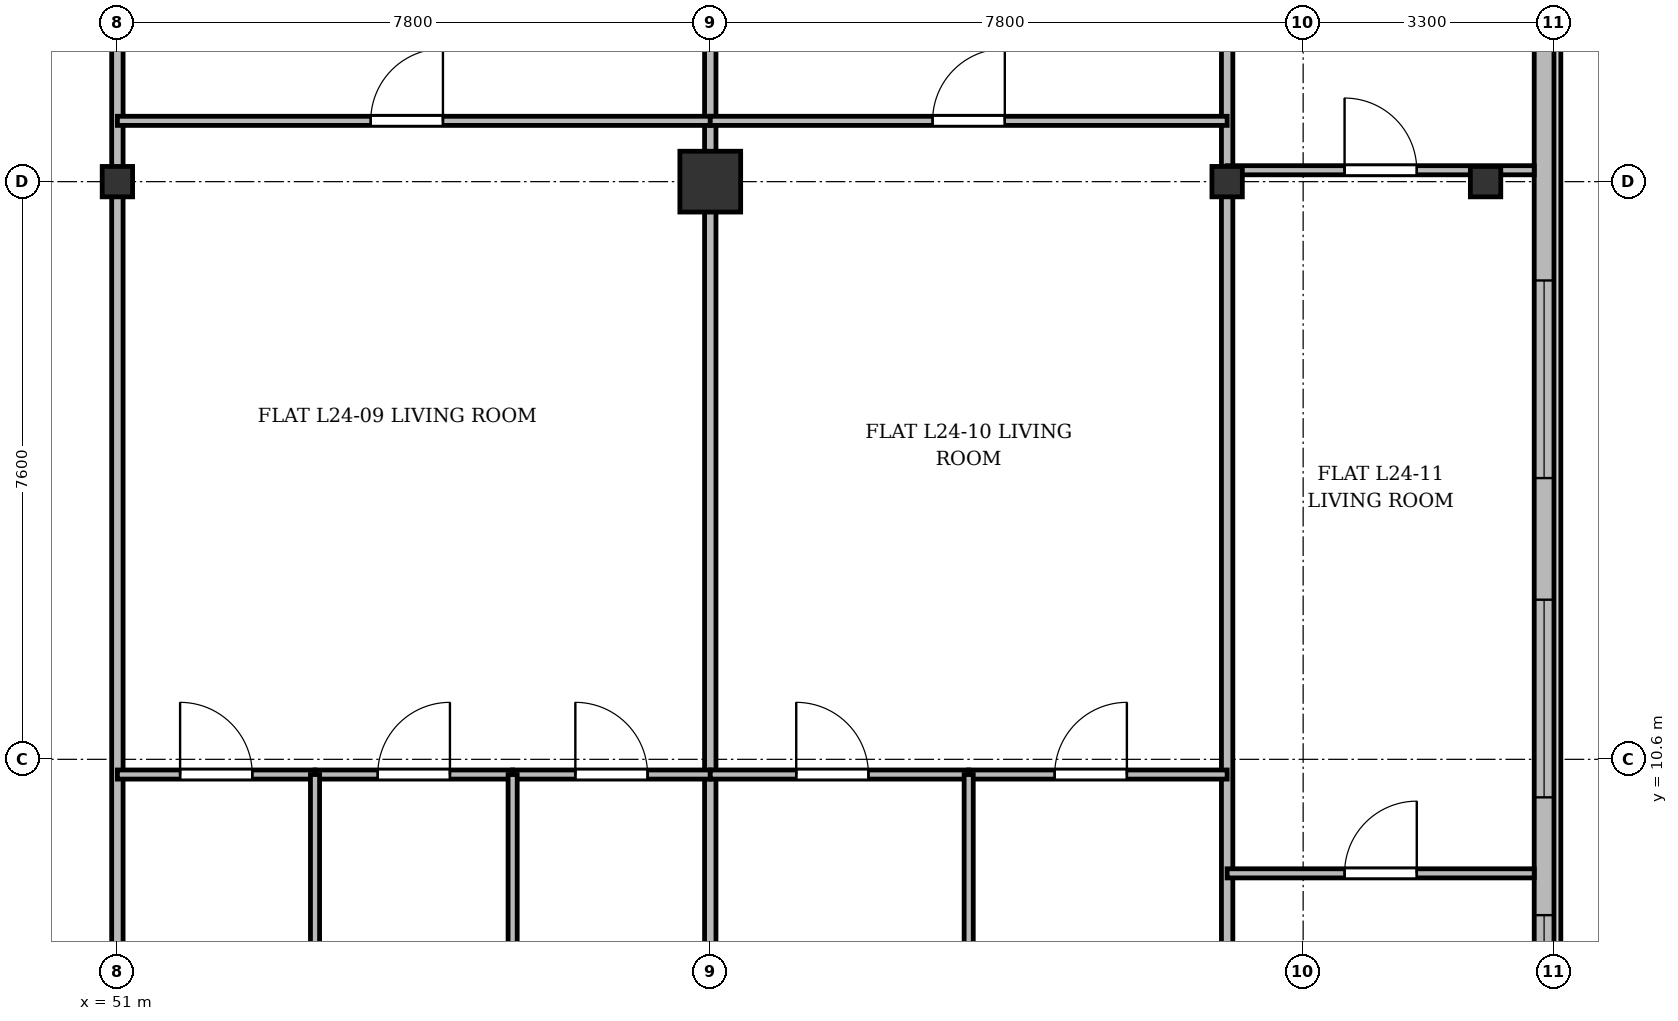
"""IFC4 building model, lengths in metres.
Left out: names, types, materials, properties, quantities, classifications, styles, units other than length and angle.
Written with IfcOpenShell. Run it as: python <this file> out.ifc"""

import sys

from ifc_helpers import new_model, si_unit, direction, frame, frame_2d, origin, origin_2d, place, context, subcontext, project, spatial, rectangle, i_section, extrude, source, transform, mapped, element, fill, save


model = new_model("IFC4")
c1 = context("Model", 3, precision=1e-05, world=origin(), true_north=direction((0.0, 1.0)))
c2 = subcontext(c1, "Body", "Model", "MODEL_VIEW")
j1 = project(units=[si_unit("LENGTHUNIT", "METRE"), si_unit("PLANEANGLEUNIT", "RADIAN")], contexts=[c1])
p1 = place(None, origin())
s1 = spatial("IfcSite", under=j1, at=p1, CompositionType="ELEMENT")
p2 = place(p1, origin())
s2 = spatial("IfcBuilding", under=s1, at=p2, CompositionType="ELEMENT")
p3 = place(p2, frame((0.0, 0.0, 96.1)))
s3 = spatial("IfcBuildingStorey", under=s2, at=p3, CompositionType="ELEMENT", Elevation=96.1)
m1 = source(origin(), c2, "Body", "SweptSolid", [
    extrude(i_section(OverallWidth=0.4, OverallDepth=0.4, WebThickness=0.022, FlangeThickness=0.035, at=origin_2d()), origin(), (0.0, 0.0, 1.0), 3.6),
])
p4 = place(p3, frame((51.0, 18.2, 0.0), z_axis=(0.0, 0.0, 1.0), x_axis=(1.0, 0.0, 0.0)))
e1 = element("IfcColumn", 1, at=p4, inside=s3, PredefinedType="COLUMN", context=c2, shape_type="MappedRepresentation", body=[
    mapped(m1, transform((0.0, 0.0, 0.0), x_axis=(1.0, 0.0, 0.0), y_axis=(0.0, 1.0, 0.0), z_axis=(0.0, 0.0, 1.0), scale=1.0)),
])
m2 = source(origin(), c2, "Body", "SweptSolid", [
    extrude(rectangle(XDim=0.8, YDim=0.8, at=origin_2d()), origin(), (0.0, 0.0, 1.0), 3.6),
])
p5 = place(p3, frame((58.8, 18.2, 0.0), z_axis=(0.0, 0.0, 1.0), x_axis=(1.0, 0.0, 0.0)))
e2 = element("IfcColumn", 2, at=p5, inside=s3, PredefinedType="COLUMN", context=c2, shape_type="MappedRepresentation", body=[
    mapped(m2, transform((0.0, 0.0, 0.0), x_axis=(1.0, 0.0, 0.0), y_axis=(0.0, 1.0, 0.0), z_axis=(0.0, 0.0, 1.0), scale=1.0)),
])
for number, where, z_axis, x_axis in (
    (3, (65.6, 18.2, 0.0), (0.0, 0.0, 1.0), (1.0, 0.0, 0.0)),
    (4, (69.0, 18.2, 0.0), (0.0, 0.0, 1.0), (1.0, 0.0, 0.0)),
):
    element("IfcColumn", number, at=place(p3, frame(where, z_axis=z_axis, x_axis=x_axis)), inside=s3, PredefinedType="COLUMN", context=c2, shape_type="MappedRepresentation", body=[
        mapped(m1, transform((0.0, 0.0, 0.0), x_axis=(1.0, 0.0, 0.0), y_axis=(0.0, 1.0, 0.0), z_axis=(0.0, 0.0, 1.0), scale=1.0)),
    ])
p6 = place(p3, frame((69.77, 45.5, 0.0), z_axis=(0.0, 0.0, 1.0), x_axis=(0.0, -1.0, 0.0)))
e5 = element("IfcWall", 5, at=p6, inside=s3, PredefinedType="SOLIDWALL", context=c2, shape_type="SweptSolid", body=[
    extrude(rectangle(XDim=39.6, YDim=0.26, at=frame_2d((19.8, 0.0))), origin(), (0.0, 0.0, 1.0), 3.34),
])
p7 = place(p6, frame((36.95, 0.0, 0.92)))
e6 = element("IfcOpeningElement", 6, at=p7, cuts=e5, PredefinedType="OPENING", context=c2, shape_type="SweptSolid", body=[
    extrude(rectangle(XDim=1.2, YDim=1.65, at=frame_2d((0.6, 0.825))), frame((0.0, 0.14, 0.0), z_axis=(0.0, -1.0, 0.0), x_axis=(1.0, 0.0, 0.0)), (0.0, 0.0, 1.0), 0.28),
])
p8 = place(p6, frame((32.8, 0.0, 0.92)))
e7 = element("IfcOpeningElement", 7, at=p8, cuts=e5, PredefinedType="OPENING", context=c2, shape_type="SweptSolid", body=[
    extrude(rectangle(XDim=2.6, YDim=1.9, at=frame_2d((1.3, 0.95))), frame((0.0, 0.14, 0.0), z_axis=(0.0, -1.0, 0.0), x_axis=(1.0, 0.0, 0.0)), (0.0, 0.0, 1.0), 0.28),
])
p9 = place(p6, frame((28.6, 0.0, 0.92)))
e8 = element("IfcOpeningElement", 8, at=p9, cuts=e5, PredefinedType="OPENING", context=c2, shape_type="SweptSolid", body=[
    extrude(rectangle(XDim=2.6, YDim=1.9, at=frame_2d((1.3, 0.95))), frame((0.0, 0.14, 0.0), z_axis=(0.0, -1.0, 0.0), x_axis=(1.0, 0.0, 0.0)), (0.0, 0.0, 1.0), 0.28),
])
p10 = place(p6, frame((21.4, 0.0, 0.92)))
e9 = element("IfcOpeningElement", 9, at=p10, cuts=e5, PredefinedType="OPENING", context=c2, shape_type="SweptSolid", body=[
    extrude(rectangle(XDim=2.6, YDim=1.9, at=frame_2d((1.3, 0.95))), frame((0.0, 0.14, 0.0), z_axis=(0.0, -1.0, 0.0), x_axis=(1.0, 0.0, 0.0)), (0.0, 0.0, 1.0), 0.28),
])
p11 = place(p6, frame((7.4, 0.0, 0.92)))
e10 = element("IfcOpeningElement", 10, at=p11, cuts=e5, PredefinedType="OPENING", context=c2, shape_type="SweptSolid", body=[
    extrude(rectangle(XDim=2.6, YDim=1.9, at=frame_2d((1.3, 0.95))), frame((0.0, 0.14, 0.0), z_axis=(0.0, -1.0, 0.0), x_axis=(1.0, 0.0, 0.0)), (0.0, 0.0, 1.0), 0.28),
])
p12 = place(p6, frame((4.5, 0.0, 0.92)))
e11 = element("IfcOpeningElement", 11, at=p12, cuts=e5, PredefinedType="OPENING", context=c2, shape_type="SweptSolid", body=[
    extrude(rectangle(XDim=1.2, YDim=1.65, at=frame_2d((0.6, 0.825))), frame((0.0, 0.14, 0.0), z_axis=(0.0, -1.0, 0.0), x_axis=(1.0, 0.0, 0.0)), (0.0, 0.0, 1.0), 0.28),
])
p13 = place(p6, frame((1.15, 0.0, 0.92)))
e12 = element("IfcOpeningElement", 12, at=p13, cuts=e5, PredefinedType="OPENING", context=c2, shape_type="SweptSolid", body=[
    extrude(rectangle(XDim=1.2, YDim=1.65, at=frame_2d((0.6, 0.825))), frame((0.0, 0.14, 0.0), z_axis=(0.0, -1.0, 0.0), x_axis=(1.0, 0.0, 0.0)), (0.0, 0.0, 1.0), 0.28),
])
for number, where, z_axis, x_axis in (
    (13, (51.0, 3.145, 0.0), (0.0, 0.0, 1.0), (0.0, 1.0, 0.0)),
    (14, (58.8, 3.145, 0.0), (0.0, 0.0, 1.0), (0.0, 1.0, 0.0)),
    (15, (65.6, 3.145, 0.0), (0.0, 0.0, 1.0), (0.0, 1.0, 0.0)),
):
    element("IfcWall", number, at=place(p3, frame(where, z_axis=z_axis, x_axis=x_axis)), inside=s3, PredefinedType="PARTITIONING", context=c2, shape_type="SweptSolid", body=[
        extrude(rectangle(XDim=24.455, YDim=0.15, at=frame_2d((12.228, 0.0))), origin(), (0.0, 0.0, 1.0), 2.84),
    ])
p14 = place(p3, frame((51.0, 19.0, 0.0), z_axis=(0.0, 0.0, 1.0), x_axis=(1.0, 0.0, 0.0)))
e16 = element("IfcWall", 16, at=p14, inside=s3, PredefinedType="PARTITIONING", context=c2, shape_type="SweptSolid", body=[
    extrude(rectangle(XDim=7.8, YDim=0.12, at=frame_2d((3.9, 0.0))), origin(), (0.0, 0.0, 1.0), 2.84),
])
p15 = place(p14, frame((3.333, 0.0, 0.0)))
e17 = element("IfcOpeningElement", 17, at=p15, cuts=e16, PredefinedType="OPENING", context=c2, shape_type="SweptSolid", body=[
    extrude(rectangle(XDim=0.95, YDim=2.15, at=frame_2d((0.475, 1.075))), frame((0.0, 0.07, 0.0), z_axis=(0.0, -1.0, 0.0), x_axis=(1.0, 0.0, 0.0)), (0.0, 0.0, 1.0), 0.14),
])
p16 = place(p3, frame((51.0, 10.4, 0.0), z_axis=(0.0, 0.0, 1.0), x_axis=(1.0, 0.0, 0.0)))
e18 = element("IfcWall", 18, at=p16, inside=s3, PredefinedType="PARTITIONING", context=c2, shape_type="SweptSolid", body=[
    extrude(rectangle(XDim=2.6, YDim=0.12, at=frame_2d((1.3, 0.0))), origin(), (0.0, 0.0, 1.0), 2.84),
])
p17 = place(p16, frame((0.825, 0.0, 0.0)))
e19 = element("IfcOpeningElement", 19, at=p17, cuts=e18, PredefinedType="OPENING", context=c2, shape_type="SweptSolid", body=[
    extrude(rectangle(XDim=0.95, YDim=2.15, at=frame_2d((0.475, 1.075))), frame((0.0, 0.07, 0.0), z_axis=(0.0, -1.0, 0.0), x_axis=(1.0, 0.0, 0.0)), (0.0, 0.0, 1.0), 0.14),
])
p18 = place(p3, frame((53.6, 10.4, 0.0), z_axis=(0.0, 0.0, 1.0), x_axis=(1.0, 0.0, 0.0)))
e20 = element("IfcWall", 20, at=p18, inside=s3, PredefinedType="PARTITIONING", context=c2, shape_type="SweptSolid", body=[
    extrude(rectangle(XDim=2.6, YDim=0.12, at=frame_2d((1.3, 0.0))), origin(), (0.0, 0.0, 1.0), 3.34),
])
p19 = place(p18, frame((0.825, 0.0, 0.0)))
e21 = element("IfcOpeningElement", 21, at=p19, cuts=e20, PredefinedType="OPENING", context=c2, shape_type="SweptSolid", body=[
    extrude(rectangle(XDim=0.95, YDim=2.15, at=frame_2d((0.475, 1.075))), frame((0.0, 0.07, 0.0), z_axis=(0.0, -1.0, 0.0), x_axis=(1.0, 0.0, 0.0)), (0.0, 0.0, 1.0), 0.14),
])
p20 = place(p3, frame((53.6, 3.145, 0.0), z_axis=(0.0, 0.0, 1.0), x_axis=(0.0, 1.0, 0.0)))
e22 = element("IfcWall", 22, at=p20, inside=s3, PredefinedType="PARTITIONING", context=c2, shape_type="SweptSolid", body=[
    extrude(rectangle(XDim=7.255, YDim=0.12, at=frame_2d((3.627, 0.0))), origin(), (0.0, 0.0, 1.0), 2.752),
])
p21 = place(p3, frame((56.2, 10.4, 0.0), z_axis=(0.0, 0.0, 1.0), x_axis=(1.0, 0.0, 0.0)))
e23 = element("IfcWall", 23, at=p21, inside=s3, PredefinedType="PARTITIONING", context=c2, shape_type="SweptSolid", body=[
    extrude(rectangle(XDim=2.6, YDim=0.12, at=frame_2d((1.3, 0.0))), origin(), (0.0, 0.0, 1.0), 2.84),
])
p22 = place(p21, frame((0.825, 0.0, 0.0)))
e24 = element("IfcOpeningElement", 24, at=p22, cuts=e23, PredefinedType="OPENING", context=c2, shape_type="SweptSolid", body=[
    extrude(rectangle(XDim=0.95, YDim=2.15, at=frame_2d((0.475, 1.075))), frame((0.0, 0.07, 0.0), z_axis=(0.0, -1.0, 0.0), x_axis=(1.0, 0.0, 0.0)), (0.0, 0.0, 1.0), 0.14),
])
p23 = place(p3, frame((56.2, 3.145, 0.0), z_axis=(0.0, 0.0, 1.0), x_axis=(0.0, 1.0, 0.0)))
e25 = element("IfcWall", 25, at=p23, inside=s3, PredefinedType="PARTITIONING", context=c2, shape_type="SweptSolid", body=[
    extrude(rectangle(XDim=7.255, YDim=0.12, at=frame_2d((3.627, 0.0))), origin(), (0.0, 0.0, 1.0), 2.752),
])
p24 = place(p3, frame((58.8, 19.0, 0.0), z_axis=(0.0, 0.0, 1.0), x_axis=(1.0, 0.0, 0.0)))
e26 = element("IfcWall", 26, at=p24, inside=s3, PredefinedType="PARTITIONING", context=c2, shape_type="SweptSolid", body=[
    extrude(rectangle(XDim=6.8, YDim=0.12, at=frame_2d((3.4, 0.0))), origin(), (0.0, 0.0, 1.0), 2.84),
])
p25 = place(p24, frame((2.925, 0.0, 0.0)))
e27 = element("IfcOpeningElement", 27, at=p25, cuts=e26, PredefinedType="OPENING", context=c2, shape_type="SweptSolid", body=[
    extrude(rectangle(XDim=0.95, YDim=2.15, at=frame_2d((0.475, 1.075))), frame((0.0, 0.07, 0.0), z_axis=(0.0, -1.0, 0.0), x_axis=(1.0, 0.0, 0.0)), (0.0, 0.0, 1.0), 0.14),
])
p26 = place(p3, frame((58.8, 10.4, 0.0), z_axis=(0.0, 0.0, 1.0), x_axis=(1.0, 0.0, 0.0)))
e28 = element("IfcWall", 28, at=p26, inside=s3, PredefinedType="PARTITIONING", context=c2, shape_type="SweptSolid", body=[
    extrude(rectangle(XDim=3.4, YDim=0.12, at=frame_2d((1.7, 0.0))), origin(), (0.0, 0.0, 1.0), 2.84),
])
p27 = place(p26, frame((1.131, 0.0, 0.0)))
e29 = element("IfcOpeningElement", 29, at=p27, cuts=e28, PredefinedType="OPENING", context=c2, shape_type="SweptSolid", body=[
    extrude(rectangle(XDim=0.95, YDim=2.15, at=frame_2d((0.475, 1.075))), frame((0.0, 0.07, 0.0), z_axis=(0.0, -1.0, 0.0), x_axis=(1.0, 0.0, 0.0)), (0.0, 0.0, 1.0), 0.14),
])
p28 = place(p3, frame((62.2, 10.4, 0.0), z_axis=(0.0, 0.0, 1.0), x_axis=(1.0, 0.0, 0.0)))
e30 = element("IfcWall", 30, at=p28, inside=s3, PredefinedType="PARTITIONING", context=c2, shape_type="SweptSolid", body=[
    extrude(rectangle(XDim=3.4, YDim=0.12, at=frame_2d((1.7, 0.0))), origin(), (0.0, 0.0, 1.0), 2.84),
])
p29 = place(p28, frame((1.131, 0.0, 0.0)))
e31 = element("IfcOpeningElement", 31, at=p29, cuts=e30, PredefinedType="OPENING", context=c2, shape_type="SweptSolid", body=[
    extrude(rectangle(XDim=0.95, YDim=2.15, at=frame_2d((0.475, 1.075))), frame((0.0, 0.07, 0.0), z_axis=(0.0, -1.0, 0.0), x_axis=(1.0, 0.0, 0.0)), (0.0, 0.0, 1.0), 0.14),
])
p30 = place(p3, frame((62.2, 3.145, 0.0), z_axis=(0.0, 0.0, 1.0), x_axis=(0.0, 1.0, 0.0)))
e32 = element("IfcWall", 32, at=p30, inside=s3, PredefinedType="PARTITIONING", context=c2, shape_type="SweptSolid", body=[
    extrude(rectangle(XDim=7.255, YDim=0.12, at=frame_2d((3.627, 0.0))), origin(), (0.0, 0.0, 1.0), 2.752),
])
p31 = place(p3, frame((65.6, 18.35, 0.0), z_axis=(0.0, 0.0, 1.0), x_axis=(1.0, 0.0, 0.0)))
e33 = element("IfcWall", 33, at=p31, inside=s3, PredefinedType="PARTITIONING", context=c2, shape_type="SweptSolid", body=[
    extrude(rectangle(XDim=4.04, YDim=0.12, at=frame_2d((2.02, 0.0))), origin(), (0.0, 0.0, 1.0), 2.752),
])
p32 = place(p31, frame((1.545, 0.0, 0.0)))
e34 = element("IfcOpeningElement", 34, at=p32, cuts=e33, PredefinedType="OPENING", context=c2, shape_type="SweptSolid", body=[
    extrude(rectangle(XDim=0.95, YDim=2.15, at=frame_2d((0.475, 1.075))), frame((0.0, 0.07, 0.0), z_axis=(0.0, -1.0, 0.0), x_axis=(1.0, 0.0, 0.0)), (0.0, 0.0, 1.0), 0.14),
])
p33 = place(p3, frame((65.6, 9.1, 0.0), z_axis=(0.0, 0.0, 1.0), x_axis=(1.0, 0.0, 0.0)))
e35 = element("IfcWall", 35, at=p33, inside=s3, PredefinedType="PARTITIONING", context=c2, shape_type="SweptSolid", body=[
    extrude(rectangle(XDim=4.04, YDim=0.12, at=frame_2d((2.02, 0.0))), origin(), (0.0, 0.0, 1.0), 2.84),
])
p34 = place(p33, frame((1.545, 0.0, 0.0)))
e36 = element("IfcOpeningElement", 36, at=p34, cuts=e35, PredefinedType="OPENING", context=c2, shape_type="SweptSolid", body=[
    extrude(rectangle(XDim=0.95, YDim=2.15, at=frame_2d((0.475, 1.075))), frame((0.0, 0.07, 0.0), z_axis=(0.0, -1.0, 0.0), x_axis=(1.0, 0.0, 0.0)), (0.0, 0.0, 1.0), 0.14),
])
m3 = source(origin(), c2, "Body", "SweptSolid", [
    extrude(rectangle(XDim=1.2, YDim=1.65, at=frame_2d((0.6, 0.825))), frame((0.0, 0.03, 0.0), z_axis=(0.0, -1.0, 0.0), x_axis=(1.0, 0.0, 0.0)), (0.0, 0.0, 1.0), 0.06),
])
p35 = place(p7, origin())
e37 = element("IfcWindow", 37, at=p35, inside=s3, PartitioningType="SINGLE_PANEL", PredefinedType="WINDOW", context=c2, shape_type="MappedRepresentation", body=[
    mapped(m3, transform((0.0, 0.0, 0.0), x_axis=(1.0, 0.0, 0.0), y_axis=(0.0, 1.0, 0.0), z_axis=(0.0, 0.0, 1.0), scale=1.0)),
])
fill(e6, e37)
m4 = source(origin(), c2, "Body", "SweptSolid", [
    extrude(rectangle(XDim=2.6, YDim=1.9, at=frame_2d((1.3, 0.95))), frame((0.0, 0.03, 0.0), z_axis=(0.0, -1.0, 0.0), x_axis=(1.0, 0.0, 0.0)), (0.0, 0.0, 1.0), 0.06),
])
p36 = place(p8, origin())
e38 = element("IfcWindow", 38, at=p36, inside=s3, PartitioningType="SINGLE_PANEL", PredefinedType="WINDOW", context=c2, shape_type="MappedRepresentation", body=[
    mapped(m4, transform((0.0, 0.0, 0.0), x_axis=(1.0, 0.0, 0.0), y_axis=(0.0, 1.0, 0.0), z_axis=(0.0, 0.0, 1.0), scale=1.0)),
])
fill(e7, e38)
p37 = place(p9, origin())
e39 = element("IfcWindow", 39, at=p37, inside=s3, PartitioningType="SINGLE_PANEL", PredefinedType="WINDOW", context=c2, shape_type="MappedRepresentation", body=[
    mapped(m4, transform((0.0, 0.0, 0.0), x_axis=(1.0, 0.0, 0.0), y_axis=(0.0, 1.0, 0.0), z_axis=(0.0, 0.0, 1.0), scale=1.0)),
])
fill(e8, e39)
m5 = source(origin(), c2, "Body", "SweptSolid", [
    extrude(rectangle(XDim=0.95, YDim=2.15, at=frame_2d((0.475, 1.075))), frame((0.0, 0.025, 0.0), z_axis=(0.0, -1.0, 0.0), x_axis=(1.0, 0.0, 0.0)), (0.0, 0.0, 1.0), 0.05),
])
p38 = place(p15, origin())
e40 = element("IfcDoor", 40, at=p38, inside=s3, OperationType="SINGLE_SWING_RIGHT", PredefinedType="DOOR", context=c2, shape_type="MappedRepresentation", body=[
    mapped(m5, transform((0.0, 0.0, 0.0), x_axis=(1.0, 0.0, 0.0), y_axis=(0.0, 1.0, 0.0), z_axis=(0.0, 0.0, 1.0), scale=1.0)),
])
fill(e17, e40)
p39 = place(p17, origin())
e41 = element("IfcDoor", 41, at=p39, inside=s3, OperationType="SINGLE_SWING_LEFT", PredefinedType="DOOR", context=c2, shape_type="MappedRepresentation", body=[
    mapped(m5, transform((0.0, 0.0, 0.0), x_axis=(1.0, 0.0, 0.0), y_axis=(0.0, 1.0, 0.0), z_axis=(0.0, 0.0, 1.0), scale=1.0)),
])
fill(e19, e41)
p40 = place(p19, origin())
e42 = element("IfcDoor", 42, at=p40, inside=s3, OperationType="SINGLE_SWING_RIGHT", PredefinedType="DOOR", context=c2, shape_type="MappedRepresentation", body=[
    mapped(m5, transform((0.0, 0.0, 0.0), x_axis=(1.0, 0.0, 0.0), y_axis=(0.0, 1.0, 0.0), z_axis=(0.0, 0.0, 1.0), scale=1.0)),
])
fill(e21, e42)
p41 = place(p22, origin())
e43 = element("IfcDoor", 43, at=p41, inside=s3, OperationType="SINGLE_SWING_LEFT", PredefinedType="DOOR", context=c2, shape_type="MappedRepresentation", body=[
    mapped(m5, transform((0.0, 0.0, 0.0), x_axis=(1.0, 0.0, 0.0), y_axis=(0.0, 1.0, 0.0), z_axis=(0.0, 0.0, 1.0), scale=1.0)),
])
fill(e24, e43)
p42 = place(p25, origin())
e44 = element("IfcDoor", 44, at=p42, inside=s3, OperationType="SINGLE_SWING_RIGHT", PredefinedType="DOOR", context=c2, shape_type="MappedRepresentation", body=[
    mapped(m5, transform((0.0, 0.0, 0.0), x_axis=(1.0, 0.0, 0.0), y_axis=(0.0, 1.0, 0.0), z_axis=(0.0, 0.0, 1.0), scale=1.0)),
])
fill(e27, e44)
p43 = place(p27, origin())
e45 = element("IfcDoor", 45, at=p43, inside=s3, OperationType="SINGLE_SWING_LEFT", PredefinedType="DOOR", context=c2, shape_type="MappedRepresentation", body=[
    mapped(m5, transform((0.0, 0.0, 0.0), x_axis=(1.0, 0.0, 0.0), y_axis=(0.0, 1.0, 0.0), z_axis=(0.0, 0.0, 1.0), scale=1.0)),
])
fill(e29, e45)
p44 = place(p29, origin())
e46 = element("IfcDoor", 46, at=p44, inside=s3, OperationType="SINGLE_SWING_RIGHT", PredefinedType="DOOR", context=c2, shape_type="MappedRepresentation", body=[
    mapped(m5, transform((0.0, 0.0, 0.0), x_axis=(1.0, 0.0, 0.0), y_axis=(0.0, 1.0, 0.0), z_axis=(0.0, 0.0, 1.0), scale=1.0)),
])
fill(e31, e46)
p45 = place(p32, origin())
e47 = element("IfcDoor", 47, at=p45, inside=s3, OperationType="SINGLE_SWING_LEFT", PredefinedType="DOOR", context=c2, shape_type="MappedRepresentation", body=[
    mapped(m5, transform((0.0, 0.0, 0.0), x_axis=(1.0, 0.0, 0.0), y_axis=(0.0, 1.0, 0.0), z_axis=(0.0, 0.0, 1.0), scale=1.0)),
])
fill(e34, e47)
p46 = place(p34, origin())
e48 = element("IfcDoor", 48, at=p46, inside=s3, OperationType="SINGLE_SWING_RIGHT", PredefinedType="DOOR", context=c2, shape_type="MappedRepresentation", body=[
    mapped(m5, transform((0.0, 0.0, 0.0), x_axis=(1.0, 0.0, 0.0), y_axis=(0.0, 1.0, 0.0), z_axis=(0.0, 0.0, 1.0), scale=1.0)),
])
fill(e36, e48)
save(model, sys.argv[1])
